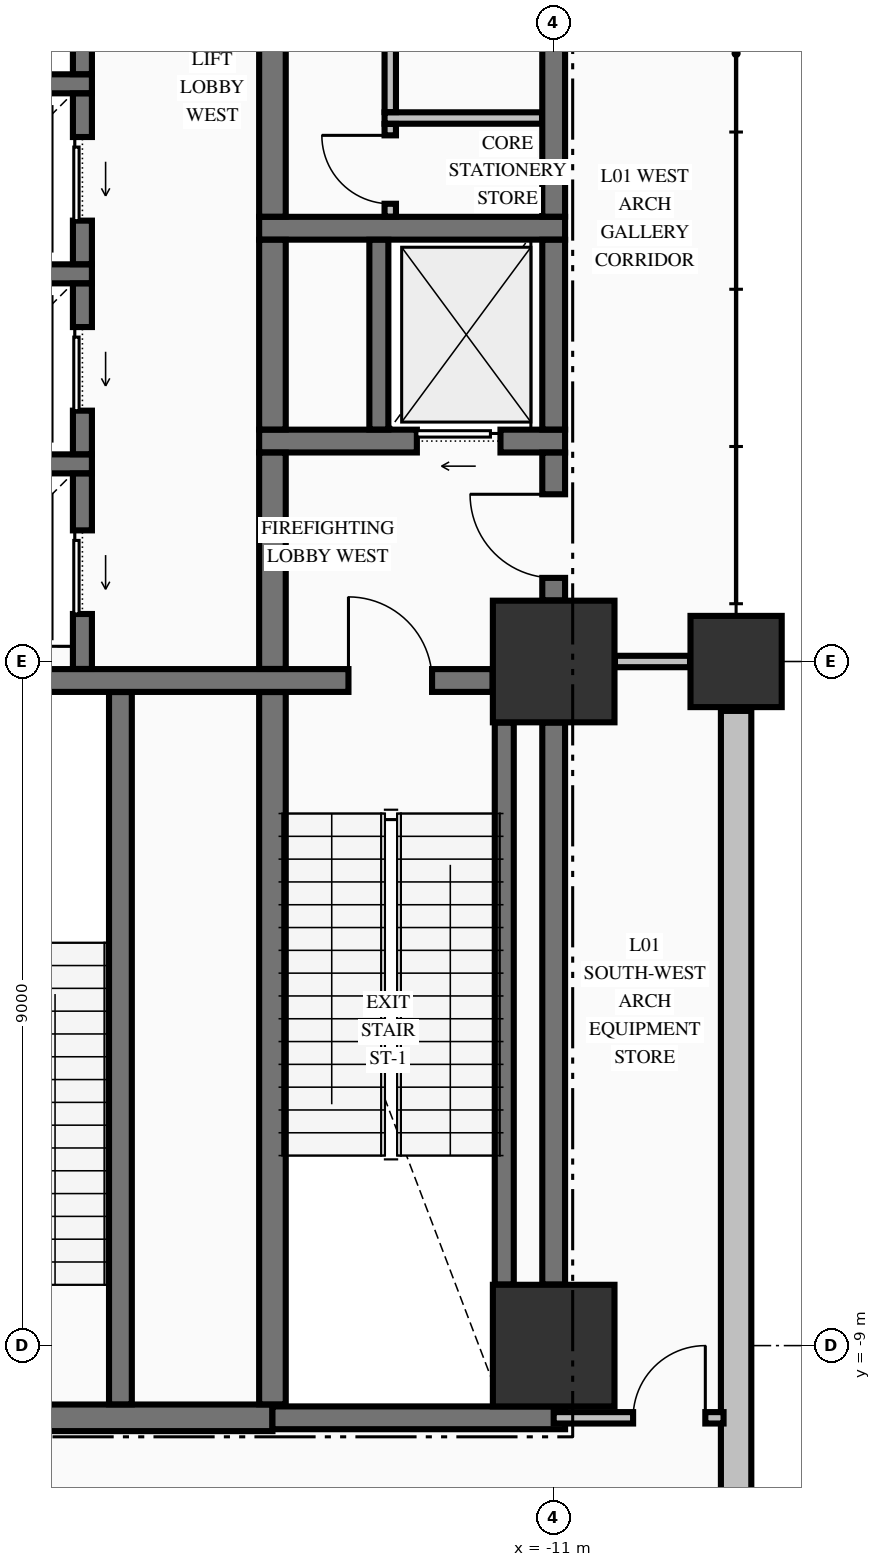
"""IFC4 building model, lengths in metres.
Left out: names, types, materials, properties, quantities, classifications, styles, units other than length and angle.
Written with IfcOpenShell. Run it as: python <this file> out.ifc"""

import sys

from ifc_helpers import new_model, si_unit, direction, frame, frame_2d, origin, origin_2d, place, context, subcontext, project, spatial, rectangle, extrude, element, fill, save


model = new_model("IFC4")
c1 = context("Model", 3, precision=1e-05, world=origin(), true_north=direction((0.0, 1.0)))
c2 = subcontext(c1, "Body", "Model", "MODEL_VIEW")
j1 = project(units=[si_unit("LENGTHUNIT", "METRE"), si_unit("PLANEANGLEUNIT", "RADIAN")], contexts=[c1])
p1 = place(None, origin())
s1 = spatial("IfcSite", under=j1, at=p1, CompositionType="ELEMENT")
p2 = place(p1, origin())
s2 = spatial("IfcBuilding", under=s1, at=p2, CompositionType="ELEMENT")
p3 = place(p2, frame((0.0, 0.0, 5.44)))
s3 = spatial("IfcBuildingStorey", under=s2, at=p3, CompositionType="ELEMENT", Elevation=5.44)
for number, where, z_axis, x_axis in (
    (1, (-11.0, -9.0, 0.0), (0.0, 0.0, 1.0), (1.0, 0.0, 0.0)),
    (2, (-11.0, 0.0, 0.0), (0.0, 0.0, 1.0), (1.0, 0.0, 0.0)),
):
    element("IfcColumn", number, at=place(p3, frame(where, z_axis=z_axis, x_axis=x_axis)), inside=s3, PredefinedType="COLUMN", context=c2, shape_type="SweptSolid", body=[
        extrude(rectangle(XDim=1.6, YDim=1.6, at=origin_2d()), origin(), (0.0, 0.0, 1.0), 5.09),
    ])
p4 = place(p3, frame((-8.6, 0.0, 0.0), z_axis=(0.0, 0.0, 1.0), x_axis=(1.0, 0.0, 0.0)))
e3 = element("IfcColumn", 3, at=p4, inside=s3, PredefinedType="COLUMN", context=c2, shape_type="SweptSolid", body=[
    extrude(rectangle(XDim=1.2, YDim=1.2, at=origin_2d()), origin(), (0.0, 0.0, 1.0), 5.09),
])
p5 = place(p3, frame((-8.6, -25.37, 0.0), z_axis=(0.0, 0.0, 1.0), x_axis=(0.0, 1.0, 0.0)))
e4 = element("IfcWall", 4, at=p5, inside=s3, PredefinedType="STANDARD", context=c2, shape_type="SweptSolid", body=[
    extrude(rectangle(XDim=24.72, YDim=0.4, at=frame_2d((12.36, 0.0))), origin(), (0.0, 0.0, 1.0), 4.132),
])
p6 = place(p3, frame((-19.196, -9.95, 0.0), z_axis=(0.0, 0.0, 1.0), x_axis=(1.0, 0.0, 0.0)))
e5 = element("IfcWall", 5, at=p6, inside=s3, PredefinedType="SHEAR", context=c2, shape_type="SweptSolid", body=[
    extrude(rectangle(XDim=4.496, YDim=0.35, at=frame_2d((2.248, 0.0))), origin(), (0.0, 0.0, 1.0), 5.09),
])
p7 = place(p6, frame((0.371, 0.0, 0.0)))
e6 = element("IfcOpeningElement", 6, at=p7, cuts=e5, PredefinedType="OPENING", context=c2, shape_type="SweptSolid", body=[
    extrude(rectangle(XDim=1.05, YDim=2.15, at=frame_2d((0.525, 1.075))), frame((0.0, 0.185, 0.0), z_axis=(0.0, -1.0, 0.0), x_axis=(1.0, 0.0, 0.0)), (0.0, 0.0, 1.0), 0.37),
])
p8 = place(p3, frame((-14.7, -9.95, 0.0), z_axis=(0.0, 0.0, 1.0), x_axis=(1.0, 0.0, 0.0)))
e7 = element("IfcWall", 7, at=p8, inside=s3, PredefinedType="SHEAR", context=c2, shape_type="SweptSolid", body=[
    extrude(rectangle(XDim=3.85, YDim=0.3, at=frame_2d((1.925, 0.0))), origin(), (0.0, 0.0, 1.0), 5.09),
])
p9 = place(p3, frame((-19.196, -0.25, 0.0), z_axis=(0.0, 0.0, 1.0), x_axis=(1.0, 0.0, 0.0)))
e8 = element("IfcWall", 8, at=p9, inside=s3, PredefinedType="SHEAR", context=c2, shape_type="SweptSolid", body=[
    extrude(rectangle(XDim=7.392, YDim=0.3, at=frame_2d((3.696, 0.0))), origin(), (0.0, 0.0, 1.0), 5.09),
])
p10 = place(p9, frame((5.496, 0.0, 0.0)))
e9 = element("IfcOpeningElement", 9, at=p10, cuts=e8, PredefinedType="OPENING", context=c2, shape_type="SweptSolid", body=[
    extrude(rectangle(XDim=1.1, YDim=2.15, at=frame_2d((0.55, 1.075))), frame((0.0, 0.16, 0.0), z_axis=(0.0, -1.0, 0.0), x_axis=(1.0, 0.0, 0.0)), (0.0, 0.0, 1.0), 0.32),
])
p11 = place(p3, frame((-20.175, 2.6, 0.0), z_axis=(0.0, 0.0, 1.0), x_axis=(1.0, 0.0, 0.0)))
e10 = element("IfcWall", 10, at=p11, inside=s3, PredefinedType="SOLIDWALL", context=c2, shape_type="SweptSolid", body=[
    extrude(rectangle(XDim=3.1, YDim=0.25, at=frame_2d((1.55, 0.0))), origin(), (0.0, 0.0, 1.0), 5.09),
])
p12 = place(p3, frame((-14.875, 2.9, 0.0), z_axis=(0.0, 0.0, 1.0), x_axis=(1.0, 0.0, 0.0)))
e11 = element("IfcWall", 11, at=p12, inside=s3, PredefinedType="SHEAR", context=c2, shape_type="SweptSolid", body=[
    extrude(rectangle(XDim=4.025, YDim=0.3, at=frame_2d((2.012, 0.0))), origin(), (0.0, 0.0, 1.0), 5.09),
])
p13 = place(p12, frame((2.075, 0.0, 0.0)))
e12 = element("IfcOpeningElement", 12, at=p13, cuts=e11, PredefinedType="OPENING", context=c2, shape_type="SweptSolid", body=[
    extrude(rectangle(XDim=1.1, YDim=2.2, at=frame_2d((0.55, 1.1))), frame((0.0, 0.16, 0.0), z_axis=(0.0, -1.0, 0.0), x_axis=(1.0, 0.0, 0.0)), (0.0, 0.0, 1.0), 0.32),
])
p14 = place(p3, frame((-20.175, 5.1, 0.0), z_axis=(0.0, 0.0, 1.0), x_axis=(1.0, 0.0, 0.0)))
e13 = element("IfcWall", 13, at=p14, inside=s3, PredefinedType="SOLIDWALL", context=c2, shape_type="SweptSolid", body=[
    extrude(rectangle(XDim=3.1, YDim=0.25, at=frame_2d((1.55, 0.0))), origin(), (0.0, 0.0, 1.0), 5.09),
])
p15 = place(p3, frame((-14.875, 5.7, 0.0), z_axis=(0.0, 0.0, 1.0), x_axis=(1.0, 0.0, 0.0)))
e14 = element("IfcWall", 14, at=p15, inside=s3, PredefinedType="SHEAR", context=c2, shape_type="SweptSolid", body=[
    extrude(rectangle(XDim=4.025, YDim=0.3, at=frame_2d((2.012, 0.0))), origin(), (0.0, 0.0, 1.0), 5.09),
])
p16 = place(p3, frame((-20.175, 7.6, 0.0), z_axis=(0.0, 0.0, 1.0), x_axis=(1.0, 0.0, 0.0)))
e15 = element("IfcWall", 15, at=p16, inside=s3, PredefinedType="SOLIDWALL", context=c2, shape_type="SweptSolid", body=[
    extrude(rectangle(XDim=3.1, YDim=0.25, at=frame_2d((1.55, 0.0))), origin(), (0.0, 0.0, 1.0), 5.09),
])
p17 = place(p3, frame((-11.0, -9.95, 0.0), z_axis=(0.0, 0.0, 1.0), x_axis=(1.0, 0.0, 0.0)))
e16 = element("IfcWall", 16, at=p17, inside=s3, PredefinedType="PARTITIONING", context=c2, shape_type="SweptSolid", body=[
    extrude(rectangle(XDim=2.235, YDim=0.15, at=frame_2d((1.118, 0.0))), origin(), (0.0, 0.0, 1.0), 5.09),
])
p18 = place(p17, frame((1.045, 0.0, 0.0)))
e17 = element("IfcOpeningElement", 17, at=p18, cuts=e16, PredefinedType="OPENING", context=c2, shape_type="SweptSolid", body=[
    extrude(rectangle(XDim=0.95, YDim=2.15, at=frame_2d((0.475, 1.075))), frame((0.0, 0.085, 0.0), z_axis=(0.0, -1.0, 0.0), x_axis=(1.0, 0.0, 0.0)), (0.0, 0.0, 1.0), 0.17),
])
p19 = place(p3, frame((-10.194, 0.0, 0.0), z_axis=(0.0, 0.0, 1.0), x_axis=(1.0, 0.0, 0.0)))
e18 = element("IfcWall", 18, at=p19, inside=s3, PredefinedType="PARTITIONING", context=c2, shape_type="SweptSolid", body=[
    extrude(rectangle(XDim=0.988, YDim=0.15, at=frame_2d((0.494, 0.0))), origin(), (0.0, 0.0, 1.0), 4.132),
])
p20 = place(p3, frame((-13.225, 7.15, 0.0), z_axis=(0.0, 0.0, 1.0), x_axis=(1.0, 0.0, 0.0)))
e19 = element("IfcWall", 19, at=p20, inside=s3, PredefinedType="PARTITIONING", context=c2, shape_type="SweptSolid", body=[
    extrude(rectangle(XDim=2.072, YDim=0.15, at=frame_2d((1.036, 0.0))), origin(), (0.0, 0.0, 1.0), 5.09),
])
p21 = place(p3, frame((-17.2, -0.098, 0.0), z_axis=(0.0, 0.0, 1.0), x_axis=(0.0, 1.0, 0.0)))
e20 = element("IfcWall", 20, at=p21, inside=s3, PredefinedType="SOLIDWALL", context=c2, shape_type="SweptSolid", body=[
    extrude(rectangle(XDim=2.571, YDim=0.25, at=frame_2d((1.285, 0.0))), origin(), (0.0, 0.0, 1.0), 5.09),
])
p22 = place(p21, frame((0.723, 0.0, 0.0)))
e21 = element("IfcOpeningElement", 21, at=p22, cuts=e20, PredefinedType="OPENING", context=c2, shape_type="SweptSolid", body=[
    extrude(rectangle(XDim=1.1, YDim=2.2, at=frame_2d((0.55, 1.1))), frame((0.0, 0.135, 0.0), z_axis=(0.0, -1.0, 0.0), x_axis=(1.0, 0.0, 0.0)), (0.0, 0.0, 1.0), 0.27),
])
p23 = place(p3, frame((-17.2, 2.727, 0.0), z_axis=(0.0, 0.0, 1.0), x_axis=(0.0, 1.0, 0.0)))
e22 = element("IfcWall", 22, at=p23, inside=s3, PredefinedType="SOLIDWALL", context=c2, shape_type="SweptSolid", body=[
    extrude(rectangle(XDim=2.246, YDim=0.25, at=frame_2d((1.123, 0.0))), origin(), (0.0, 0.0, 1.0), 5.09),
])
p24 = place(p23, frame((0.573, 0.0, 0.0)))
e23 = element("IfcOpeningElement", 23, at=p24, cuts=e22, PredefinedType="OPENING", context=c2, shape_type="SweptSolid", body=[
    extrude(rectangle(XDim=1.1, YDim=2.2, at=frame_2d((0.55, 1.1))), frame((0.0, 0.135, 0.0), z_axis=(0.0, -1.0, 0.0), x_axis=(1.0, 0.0, 0.0)), (0.0, 0.0, 1.0), 0.27),
])
p25 = place(p3, frame((-17.2, 5.227, 0.0), z_axis=(0.0, 0.0, 1.0), x_axis=(0.0, 1.0, 0.0)))
e24 = element("IfcWall", 24, at=p25, inside=s3, PredefinedType="SOLIDWALL", context=c2, shape_type="SweptSolid", body=[
    extrude(rectangle(XDim=2.246, YDim=0.25, at=frame_2d((1.123, 0.0))), origin(), (0.0, 0.0, 1.0), 5.09),
])
p26 = place(p25, frame((0.573, 0.0, 0.0)))
e25 = element("IfcOpeningElement", 25, at=p26, cuts=e24, PredefinedType="OPENING", context=c2, shape_type="SweptSolid", body=[
    extrude(rectangle(XDim=1.1, YDim=2.2, at=frame_2d((0.55, 1.1))), frame((0.0, 0.135, 0.0), z_axis=(0.0, -1.0, 0.0), x_axis=(1.0, 0.0, 0.0)), (0.0, 0.0, 1.0), 0.27),
])
p27 = place(p3, frame((-17.2, 7.727, 0.0), z_axis=(0.0, 0.0, 1.0), x_axis=(0.0, 1.0, 0.0)))
e26 = element("IfcWall", 26, at=p27, inside=s3, PredefinedType="SOLIDWALL", context=c2, shape_type="SweptSolid", body=[
    extrude(rectangle(XDim=2.596, YDim=0.25, at=frame_2d((1.298, 0.0))), origin(), (0.0, 0.0, 1.0), 5.09),
])
p28 = place(p27, frame((0.773, 0.0, 0.0)))
e27 = element("IfcOpeningElement", 27, at=p28, cuts=e26, PredefinedType="OPENING", context=c2, shape_type="SweptSolid", body=[
    extrude(rectangle(XDim=1.1, YDim=2.2, at=frame_2d((0.55, 1.1))), frame((0.0, 0.135, 0.0), z_axis=(0.0, -1.0, 0.0), x_axis=(1.0, 0.0, 0.0)), (0.0, 0.0, 1.0), 0.27),
])
p29 = place(p3, frame((-16.7, -9.773, 0.0), z_axis=(0.0, 0.0, 1.0), x_axis=(0.0, 1.0, 0.0)))
e28 = element("IfcWall", 28, at=p29, inside=s3, PredefinedType="SHEAR", context=c2, shape_type="SweptSolid", body=[
    extrude(rectangle(XDim=9.371, YDim=0.3, at=frame_2d((4.686, 0.0))), origin(), (0.0, 0.0, 1.0), 5.09),
])
p30 = place(p3, frame((-14.7, -9.773, 0.0), z_axis=(0.0, 0.0, 1.0), x_axis=(0.0, 1.0, 0.0)))
e29 = element("IfcWall", 29, at=p30, inside=s3, PredefinedType="SHEAR", context=c2, shape_type="SweptSolid", body=[
    extrude(rectangle(XDim=9.371, YDim=0.35, at=frame_2d((4.686, 0.0))), origin(), (0.0, 0.0, 1.0), 5.09),
])
p31 = place(p3, frame((-14.7, -0.098, 0.0), z_axis=(0.0, 0.0, 1.0), x_axis=(0.0, 1.0, 0.0)))
e30 = element("IfcWall", 30, at=p31, inside=s3, PredefinedType="SHEAR", context=c2, shape_type="SweptSolid", body=[
    extrude(rectangle(XDim=2.846, YDim=0.35, at=frame_2d((1.423, 0.0))), origin(), (0.0, 0.0, 1.0), 5.09),
])
p32 = place(p3, frame((-14.7, 3.052, 0.0), z_axis=(0.0, 0.0, 1.0), x_axis=(0.0, 1.0, 0.0)))
e31 = element("IfcWall", 31, at=p32, inside=s3, PredefinedType="SHEAR", context=c2, shape_type="SweptSolid", body=[
    extrude(rectangle(XDim=2.496, YDim=0.35, at=frame_2d((1.248, 0.0))), origin(), (0.0, 0.0, 1.0), 5.09),
])
p33 = place(p3, frame((-14.7, 5.852, 0.0), z_axis=(0.0, 0.0, 1.0), x_axis=(0.0, 1.0, 0.0)))
e32 = element("IfcWall", 32, at=p33, inside=s3, PredefinedType="SHEAR", context=c2, shape_type="SweptSolid", body=[
    extrude(rectangle(XDim=4.471, YDim=0.35, at=frame_2d((2.235, 0.0))), origin(), (0.0, 0.0, 1.0), 5.09),
])
p34 = place(p3, frame((-13.3, 3.052, 0.0), z_axis=(0.0, 0.0, 1.0), x_axis=(0.0, 1.0, 0.0)))
e33 = element("IfcWall", 33, at=p34, inside=s3, PredefinedType="SOLIDWALL", context=c2, shape_type="SweptSolid", body=[
    extrude(rectangle(XDim=2.496, YDim=0.25, at=frame_2d((1.248, 0.0))), origin(), (0.0, 0.0, 1.0), 5.09),
])
p35 = place(p3, frame((-11.65, -8.196, 0.0), z_axis=(0.0, 0.0, 1.0), x_axis=(0.0, 1.0, 0.0)))
e34 = element("IfcWall", 34, at=p35, inside=s3, PredefinedType="SOLIDWALL", context=c2, shape_type="SweptSolid", body=[
    extrude(rectangle(XDim=7.392, YDim=0.25, at=frame_2d((3.696, 0.0))), origin(), (0.0, 0.0, 1.0), 5.09),
])
p36 = place(p3, frame((-11.0, -8.196, 0.0), z_axis=(0.0, 0.0, 1.0), x_axis=(0.0, 1.0, 0.0)))
e35 = element("IfcWall", 35, at=p36, inside=s3, PredefinedType="SHEAR", context=c2, shape_type="SweptSolid", body=[
    extrude(rectangle(XDim=7.392, YDim=0.3, at=frame_2d((3.696, 0.0))), origin(), (0.0, 0.0, 1.0), 5.09),
])
p37 = place(p3, frame((-11.0, 0.804, 0.0), z_axis=(0.0, 0.0, 1.0), x_axis=(0.0, 1.0, 0.0)))
e36 = element("IfcWall", 36, at=p37, inside=s3, PredefinedType="SHEAR", context=c2, shape_type="SweptSolid", body=[
    extrude(rectangle(XDim=1.944, YDim=0.3, at=frame_2d((0.972, 0.0))), origin(), (0.0, 0.0, 1.0), 5.09),
])
p38 = place(p37, frame((0.296, 0.0, 0.0)))
e37 = element("IfcOpeningElement", 37, at=p38, cuts=e36, PredefinedType="OPENING", context=c2, shape_type="SweptSolid", body=[
    extrude(rectangle(XDim=1.1, YDim=2.15, at=frame_2d((0.55, 1.075))), frame((0.0, 0.16, 0.0), z_axis=(0.0, -1.0, 0.0), x_axis=(1.0, 0.0, 0.0)), (0.0, 0.0, 1.0), 0.32),
])
p39 = place(p3, frame((-11.0, 3.052, 0.0), z_axis=(0.0, 0.0, 1.0), x_axis=(0.0, 1.0, 0.0)))
e38 = element("IfcWall", 38, at=p39, inside=s3, PredefinedType="SHEAR", context=c2, shape_type="SweptSolid", body=[
    extrude(rectangle(XDim=2.496, YDim=0.3, at=frame_2d((1.248, 0.0))), origin(), (0.0, 0.0, 1.0), 5.09),
])
p40 = place(p3, frame((-11.0, 5.852, 0.0), z_axis=(0.0, 0.0, 1.0), x_axis=(0.0, 1.0, 0.0)))
e39 = element("IfcWall", 39, at=p40, inside=s3, PredefinedType="SHEAR", context=c2, shape_type="SweptSolid", body=[
    extrude(rectangle(XDim=2.344, YDim=0.3, at=frame_2d((1.172, 0.0))), origin(), (0.0, 0.0, 1.0), 5.09),
])
p41 = place(p3, frame((-13.15, 5.853, 0.0), z_axis=(0.0, 0.0, 1.0), x_axis=(0.0, 1.0, 0.0)))
e40 = element("IfcWall", 40, at=p41, inside=s3, PredefinedType="PARTITIONING", context=c2, shape_type="SweptSolid", body=[
    extrude(rectangle(XDim=1.219, YDim=0.15, at=frame_2d((0.609, 0.0))), origin(), (0.0, 0.0, 1.0), 5.09),
])
p42 = place(p41, frame((0.169, 0.0, 0.0)))
e41 = element("IfcOpeningElement", 41, at=p42, cuts=e40, PredefinedType="OPENING", context=c2, shape_type="SweptSolid", body=[
    extrude(rectangle(XDim=0.9, YDim=2.15, at=frame_2d((0.45, 1.075))), frame((0.0, 0.085, 0.0), z_axis=(0.0, -1.0, 0.0), x_axis=(1.0, 0.0, 0.0)), (0.0, 0.0, 1.0), 0.17),
])
p43 = place(p3, frame((-13.15, 7.228, 0.0), z_axis=(0.0, 0.0, 1.0), x_axis=(0.0, 1.0, 0.0)))
e42 = element("IfcWall", 42, at=p43, inside=s3, PredefinedType="PARTITIONING", context=c2, shape_type="SweptSolid", body=[
    extrude(rectangle(XDim=3.119, YDim=0.15, at=frame_2d((1.56, 0.0))), origin(), (0.0, 0.0, 1.0), 5.09),
])
p44 = place(p43, frame((1.097, 0.0, 0.0)))
e43 = element("IfcOpeningElement", 43, at=p44, cuts=e42, PredefinedType="OPENING", context=c2, shape_type="SweptSolid", body=[
    extrude(rectangle(XDim=0.95, YDim=2.15, at=frame_2d((0.475, 1.075))), frame((0.0, 0.085, 0.0), z_axis=(0.0, -1.0, 0.0), x_axis=(1.0, 0.0, 0.0)), (0.0, 0.0, 1.0), 0.17),
])
p45 = place(p10, origin())
e44 = element("IfcDoor", 44, at=p45, inside=s3, OperationType="SINGLE_SWING_LEFT", PredefinedType="DOOR", context=c2, shape_type="SweptSolid", body=[
    extrude(rectangle(XDim=1.1, YDim=2.15, at=frame_2d((0.55, 1.075))), frame((0.0, 0.025, 0.0), z_axis=(0.0, -1.0, 0.0), x_axis=(1.0, 0.0, 0.0)), (0.0, 0.0, 1.0), 0.05),
])
fill(e9, e44)
p46 = place(p38, origin())
e45 = element("IfcDoor", 45, at=p46, inside=s3, OperationType="SINGLE_SWING_RIGHT", PredefinedType="DOOR", context=c2, shape_type="SweptSolid", body=[
    extrude(rectangle(XDim=1.1, YDim=2.15, at=frame_2d((0.55, 1.075))), frame((0.0, 0.025, 0.0), z_axis=(0.0, -1.0, 0.0), x_axis=(1.0, 0.0, 0.0)), (0.0, 0.0, 1.0), 0.05),
])
fill(e37, e45)
p47 = place(p13, origin())
e46 = element("IfcDoor", 46, at=p47, inside=s3, OperationType="SLIDING_TO_LEFT", PredefinedType="DOOR", context=c2, shape_type="SweptSolid", body=[
    extrude(rectangle(XDim=1.1, YDim=2.2, at=frame_2d((0.55, 1.1))), frame((0.0, 0.025, 0.0), z_axis=(0.0, -1.0, 0.0), x_axis=(1.0, 0.0, 0.0)), (0.0, 0.0, 1.0), 0.05),
])
fill(e12, e46)
p48 = place(p42, origin())
e47 = element("IfcDoor", 47, at=p48, inside=s3, OperationType="SINGLE_SWING_RIGHT", PredefinedType="DOOR", context=c2, shape_type="SweptSolid", body=[
    extrude(rectangle(XDim=0.9, YDim=2.15, at=frame_2d((0.45, 1.075))), frame((0.0, 0.025, 0.0), z_axis=(0.0, -1.0, 0.0), x_axis=(1.0, 0.0, 0.0)), (0.0, 0.0, 1.0), 0.05),
])
fill(e41, e47)
p49 = place(p22, origin())
e48 = element("IfcDoor", 48, at=p49, inside=s3, OperationType="SLIDING_TO_LEFT", PredefinedType="DOOR", context=c2, shape_type="SweptSolid", body=[
    extrude(rectangle(XDim=1.1, YDim=2.2, at=frame_2d((0.55, 1.1))), frame((0.0, 0.025, 0.0), z_axis=(0.0, -1.0, 0.0), x_axis=(1.0, 0.0, 0.0)), (0.0, 0.0, 1.0), 0.05),
])
fill(e21, e48)
p50 = place(p24, origin())
e49 = element("IfcDoor", 49, at=p50, inside=s3, OperationType="SLIDING_TO_LEFT", PredefinedType="DOOR", context=c2, shape_type="SweptSolid", body=[
    extrude(rectangle(XDim=1.1, YDim=2.2, at=frame_2d((0.55, 1.1))), frame((0.0, 0.025, 0.0), z_axis=(0.0, -1.0, 0.0), x_axis=(1.0, 0.0, 0.0)), (0.0, 0.0, 1.0), 0.05),
])
fill(e23, e49)
p51 = place(p26, origin())
e50 = element("IfcDoor", 50, at=p51, inside=s3, OperationType="SLIDING_TO_LEFT", PredefinedType="DOOR", context=c2, shape_type="SweptSolid", body=[
    extrude(rectangle(XDim=1.1, YDim=2.2, at=frame_2d((0.55, 1.1))), frame((0.0, 0.025, 0.0), z_axis=(0.0, -1.0, 0.0), x_axis=(1.0, 0.0, 0.0)), (0.0, 0.0, 1.0), 0.05),
])
fill(e25, e50)
p52 = place(p18, origin())
e51 = element("IfcDoor", 51, at=p52, inside=s3, OperationType="SINGLE_SWING_RIGHT", PredefinedType="DOOR", context=c2, shape_type="SweptSolid", body=[
    extrude(rectangle(XDim=0.95, YDim=2.15, at=frame_2d((0.475, 1.075))), frame((0.0, 0.025, 0.0), z_axis=(0.0, -1.0, 0.0), x_axis=(1.0, 0.0, 0.0)), (0.0, 0.0, 1.0), 0.05),
])
fill(e17, e51)
save(model, sys.argv[1])
